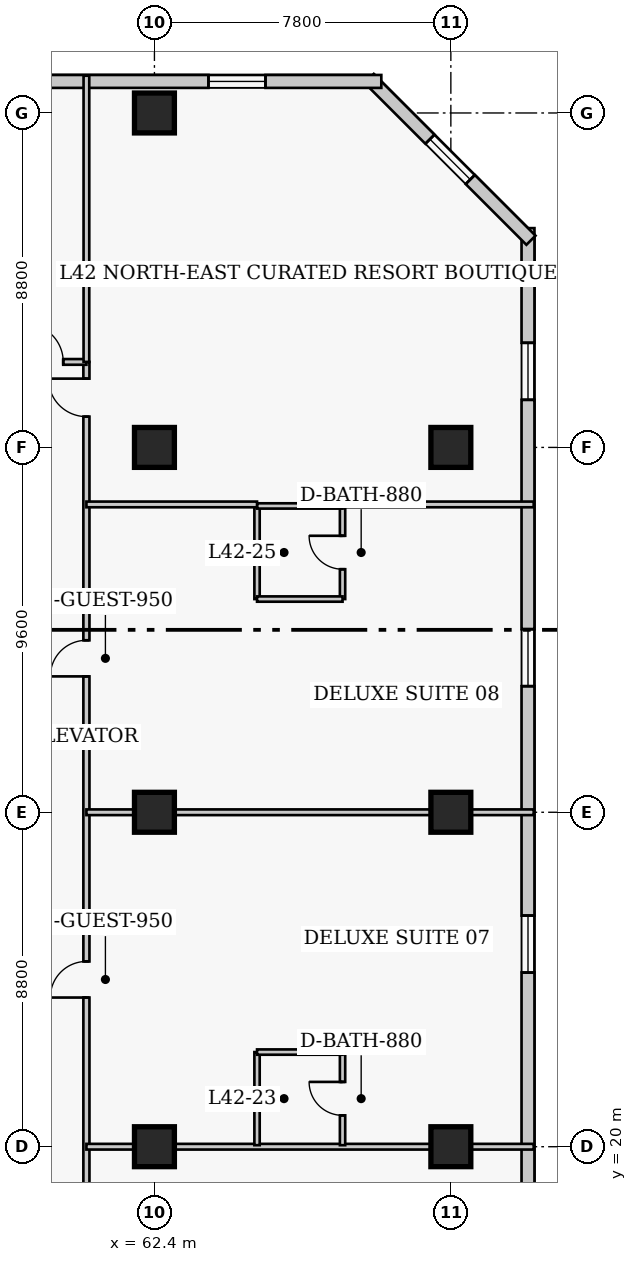
"""IFC4 building model, lengths in metres.
Left out: names, types, materials, properties, quantities, classifications, styles, units other than length and angle.
Written with IfcOpenShell. Run it as: python <this file> out.ifc"""

import sys

from ifc_helpers import new_model, si_unit, direction, frame, frame_2d, origin, origin_2d, place, context, subcontext, project, spatial, rectangle, extrude, element, fill, save


model = new_model("IFC4")
c1 = context("Model", 3, precision=1e-05, world=origin(), true_north=direction((0.0, 1.0)))
c2 = subcontext(c1, "Body", "Model", "MODEL_VIEW")
j1 = project(units=[si_unit("LENGTHUNIT", "METRE"), si_unit("PLANEANGLEUNIT", "RADIAN")], contexts=[c1])
p1 = place(None, origin())
s1 = spatial("IfcSite", under=j1, at=p1, CompositionType="ELEMENT")
p2 = place(p1, origin())
s2 = spatial("IfcBuilding", under=s1, at=p2, CompositionType="ELEMENT")
p3 = place(p2, frame((0.0, 0.0, 168.8)))
s3 = spatial("IfcBuildingStorey", under=s2, at=p3, CompositionType="ELEMENT", Elevation=168.8)
for number, where, z_axis, x_axis in (
    (1, (62.4, 20.0, 0.0), (0.0, 0.0, 1.0), (1.0, 0.0, 0.0)),
    (2, (62.4, 28.8, 0.0), (0.0, 0.0, 1.0), (1.0, 0.0, 0.0)),
    (3, (62.4, 38.4, 0.0), (0.0, 0.0, 1.0), (1.0, 0.0, 0.0)),
    (4, (62.4, 47.2, 0.0), (0.0, 0.0, 1.0), (1.0, 0.0, 0.0)),
    (5, (70.2, 20.0, 0.0), (0.0, 0.0, 1.0), (1.0, 0.0, 0.0)),
    (6, (70.2, 28.8, 0.0), (0.0, 0.0, 1.0), (1.0, 0.0, 0.0)),
    (7, (70.2, 38.4, 0.0), (0.0, 0.0, 1.0), (1.0, 0.0, 0.0)),
):
    element("IfcColumn", number, at=place(p3, frame(where, z_axis=z_axis, x_axis=x_axis)), inside=s3, PredefinedType="COLUMN", context=c2, shape_type="SweptSolid", body=[
        extrude(rectangle(XDim=1.05, YDim=1.05, at=origin_2d()), origin(), (0.0, 0.0, 1.0), 3.8),
    ])
p4 = place(p3, frame((72.23, 14.03, 0.0), z_axis=(0.0, 0.0, 1.0), x_axis=(0.0, 1.0, 0.0)))
e8 = element("IfcWall", 8, at=p4, inside=s3, PredefinedType="SOLIDWALL", context=c2, shape_type="SweptSolid", body=[
    extrude(rectangle(XDim=30.14, YDim=0.34, at=frame_2d((15.07, 0.0))), origin(), (0.0, 0.0, 1.0), 3.55),
])
p5 = place(p4, frame((3.018, 0.0, 0.85)))
e9 = element("IfcOpeningElement", 9, at=p5, cuts=e8, PredefinedType="OPENING", context=c2, shape_type="SweptSolid", body=[
    extrude(rectangle(XDim=1.5, YDim=1.75, at=frame_2d((0.75, 0.875))), frame((0.0, 0.18, 0.0), z_axis=(0.0, -1.0, 0.0), x_axis=(1.0, 0.0, 0.0)), (0.0, 0.0, 1.0), 0.36),
])
p6 = place(p4, frame((10.552, 0.0, 0.85)))
e10 = element("IfcOpeningElement", 10, at=p6, cuts=e8, PredefinedType="OPENING", context=c2, shape_type="SweptSolid", body=[
    extrude(rectangle(XDim=1.5, YDim=1.75, at=frame_2d((0.75, 0.875))), frame((0.0, 0.18, 0.0), z_axis=(0.0, -1.0, 0.0), x_axis=(1.0, 0.0, 0.0)), (0.0, 0.0, 1.0), 0.36),
])
p7 = place(p4, frame((18.087, 0.0, 0.85)))
e11 = element("IfcOpeningElement", 11, at=p7, cuts=e8, PredefinedType="OPENING", context=c2, shape_type="SweptSolid", body=[
    extrude(rectangle(XDim=1.5, YDim=1.75, at=frame_2d((0.75, 0.875))), frame((0.0, 0.18, 0.0), z_axis=(0.0, -1.0, 0.0), x_axis=(1.0, 0.0, 0.0)), (0.0, 0.0, 1.0), 0.36),
])
p8 = place(p4, frame((25.623, 0.0, 0.85)))
e12 = element("IfcOpeningElement", 12, at=p8, cuts=e8, PredefinedType="OPENING", context=c2, shape_type="SweptSolid", body=[
    extrude(rectangle(XDim=1.5, YDim=1.75, at=frame_2d((0.75, 0.875))), frame((0.0, 0.18, 0.0), z_axis=(0.0, -1.0, 0.0), x_axis=(1.0, 0.0, 0.0)), (0.0, 0.0, 1.0), 0.36),
])
p9 = place(p3, frame((72.308, 43.852, 0.0), z_axis=(0.0, 0.0, 1.0), x_axis=(-0.707106781187, 0.707106781187, 0.0)))
e13 = element("IfcWall", 13, at=p9, inside=s3, PredefinedType="SOLIDWALL", context=c2, shape_type="SweptSolid", body=[
    extrude(rectangle(XDim=6.02, YDim=0.34, at=frame_2d((3.01, 0.0))), origin(), (0.0, 0.0, 1.0), 3.55),
])
p10 = place(p9, frame((2.26, 0.0, 0.85)))
e14 = element("IfcOpeningElement", 14, at=p10, cuts=e13, PredefinedType="OPENING", context=c2, shape_type="SweptSolid", body=[
    extrude(rectangle(XDim=1.5, YDim=1.75, at=frame_2d((0.75, 0.875))), frame((0.0, 0.18, 0.0), z_axis=(0.0, -1.0, 0.0), x_axis=(1.0, 0.0, 0.0)), (0.0, 0.0, 1.0), 0.36),
])
p11 = place(p3, frame((68.37, 48.03, 0.0), z_axis=(0.0, 0.0, 1.0), x_axis=(-1.0, 0.0, 0.0)))
e15 = element("IfcWall", 15, at=p11, inside=s3, PredefinedType="SOLIDWALL", context=c2, shape_type="SweptSolid", body=[
    extrude(rectangle(XDim=26.69, YDim=0.34, at=frame_2d((13.345, 0.0))), origin(), (0.0, 0.0, 1.0), 3.55),
])
p12 = place(p11, frame((3.048, 0.0, 0.85)))
e16 = element("IfcOpeningElement", 16, at=p12, cuts=e15, PredefinedType="OPENING", context=c2, shape_type="SweptSolid", body=[
    extrude(rectangle(XDim=1.5, YDim=1.75, at=frame_2d((0.75, 0.875))), frame((0.0, 0.18, 0.0), z_axis=(0.0, -1.0, 0.0), x_axis=(1.0, 0.0, 0.0)), (0.0, 0.0, 1.0), 0.36),
])
p13 = place(p11, frame((11.445, 0.0, 0.85)))
e17 = element("IfcOpeningElement", 17, at=p13, cuts=e15, PredefinedType="OPENING", context=c2, shape_type="SweptSolid", body=[
    extrude(rectangle(XDim=1.5, YDim=1.75, at=frame_2d((0.75, 0.875))), frame((0.0, 0.18, 0.0), z_axis=(0.0, -1.0, 0.0), x_axis=(1.0, 0.0, 0.0)), (0.0, 0.0, 1.0), 0.36),
])
p14 = place(p11, frame((22.642, 0.0, 0.85)))
e18 = element("IfcOpeningElement", 18, at=p14, cuts=e15, PredefinedType="OPENING", context=c2, shape_type="SweptSolid", body=[
    extrude(rectangle(XDim=1.5, YDim=1.75, at=frame_2d((0.75, 0.875))), frame((0.0, 0.18, 0.0), z_axis=(0.0, -1.0, 0.0), x_axis=(1.0, 0.0, 0.0)), (0.0, 0.0, 1.0), 0.36),
])
p15 = place(p3, frame((60.61, 12.05, 0.0), z_axis=(0.0, 0.0, 1.0), x_axis=(0.0, 1.0, 0.0)))
e19 = element("IfcWall", 19, at=p15, inside=s3, PredefinedType="PARTITIONING", context=c2, shape_type="SweptSolid", body=[
    extrude(rectangle(XDim=28.6, YDim=0.16, at=frame_2d((14.3, 0.0))), origin(), (0.0, 0.0, 1.0), 3.55),
])
p16 = place(p15, frame((3.5, 0.0, 0.0)))
e20 = element("IfcOpeningElement", 20, at=p16, cuts=e19, PredefinedType="OPENING", context=c2, shape_type="SweptSolid", body=[
    extrude(rectangle(XDim=0.95, YDim=2.1, at=frame_2d((0.475, 1.05))), frame((0.0, 0.09, 0.0), z_axis=(0.0, -1.0, 0.0), x_axis=(1.0, 0.0, 0.0)), (0.0, 0.0, 1.0), 0.18),
])
p17 = place(p15, frame((11.875, 0.0, 0.0)))
e21 = element("IfcOpeningElement", 21, at=p17, cuts=e19, PredefinedType="OPENING", context=c2, shape_type="SweptSolid", body=[
    extrude(rectangle(XDim=0.95, YDim=2.1, at=frame_2d((0.475, 1.05))), frame((0.0, 0.09, 0.0), z_axis=(0.0, -1.0, 0.0), x_axis=(1.0, 0.0, 0.0)), (0.0, 0.0, 1.0), 0.18),
])
p18 = place(p15, frame((20.325, 0.0, 0.0)))
e22 = element("IfcOpeningElement", 22, at=p18, cuts=e19, PredefinedType="OPENING", context=c2, shape_type="SweptSolid", body=[
    extrude(rectangle(XDim=0.95, YDim=2.1, at=frame_2d((0.475, 1.05))), frame((0.0, 0.09, 0.0), z_axis=(0.0, -1.0, 0.0), x_axis=(1.0, 0.0, 0.0)), (0.0, 0.0, 1.0), 0.18),
])
p19 = place(p15, frame((27.16, 0.0, 0.0)))
e23 = element("IfcOpeningElement", 23, at=p19, cuts=e19, PredefinedType="OPENING", context=c2, shape_type="SweptSolid", body=[
    extrude(rectangle(XDim=1.0, YDim=2.15, at=frame_2d((0.5, 1.075))), frame((0.0, 0.09, 0.0), z_axis=(0.0, -1.0, 0.0), x_axis=(1.0, 0.0, 0.0)), (0.0, 0.0, 1.0), 0.18),
])
p20 = place(p3, frame((56.8, 40.65, 0.0), z_axis=(0.0, 0.0, 1.0), x_axis=(1.0, 0.0, 0.0)))
e24 = element("IfcWall", 24, at=p20, inside=s3, PredefinedType="PARTITIONING", context=c2, shape_type="SweptSolid", body=[
    extrude(rectangle(XDim=3.81, YDim=0.15, at=frame_2d((1.905, 0.0))), origin(), (0.0, 0.0, 1.0), 3.55),
])
p21 = place(p20, frame((2.2, 0.0, 0.0)))
e25 = element("IfcOpeningElement", 25, at=p21, cuts=e24, PredefinedType="OPENING", context=c2, shape_type="SweptSolid", body=[
    extrude(rectangle(XDim=1.0, YDim=2.15, at=frame_2d((0.5, 1.075))), frame((0.0, 0.085, 0.0), z_axis=(0.0, -1.0, 0.0), x_axis=(1.0, 0.0, 0.0)), (0.0, 0.0, 1.0), 0.17),
])
p22 = place(p3, frame((60.61, 40.65, 0.0), z_axis=(0.0, 0.0, 1.0), x_axis=(0.0, 1.0, 0.0)))
e26 = element("IfcWall", 26, at=p22, inside=s3, PredefinedType="PARTITIONING", context=c2, shape_type="SweptSolid", body=[
    extrude(rectangle(XDim=7.53, YDim=0.15, at=frame_2d((3.765, 0.0))), origin(), (0.0, 0.0, 1.0), 3.55),
])
p23 = place(p3, frame((60.61, 20.0, 0.0), z_axis=(0.0, 0.0, 1.0), x_axis=(1.0, 0.0, 0.0)))
e27 = element("IfcWall", 27, at=p23, inside=s3, PredefinedType="PARTITIONING", context=c2, shape_type="SweptSolid", body=[
    extrude(rectangle(XDim=11.77, YDim=0.15, at=frame_2d((5.885, 0.0))), origin(), (0.0, 0.0, 1.0), 2.778),
])
p24 = place(p3, frame((65.1, 20.04, 0.0), z_axis=(0.0, 0.0, 1.0), x_axis=(0.0, 1.0, 0.0)))
e28 = element("IfcWall", 28, at=p24, inside=s3, PredefinedType="PLUMBINGWALL", context=c2, shape_type="SweptSolid", body=[
    extrude(rectangle(XDim=2.45, YDim=0.14, at=frame_2d((1.225, 0.0))), origin(), (0.0, 0.0, 1.0), 3.55),
])
p25 = place(p3, frame((67.35, 20.04, 0.0), z_axis=(0.0, 0.0, 1.0), x_axis=(0.0, 1.0, 0.0)))
e29 = element("IfcWall", 29, at=p25, inside=s3, PredefinedType="PLUMBINGWALL", context=c2, shape_type="SweptSolid", body=[
    extrude(rectangle(XDim=2.45, YDim=0.14, at=frame_2d((1.225, 0.0))), origin(), (0.0, 0.0, 1.0), 3.55),
])
p26 = place(p25, frame((0.785, 0.0, 0.0)))
e30 = element("IfcOpeningElement", 30, at=p26, cuts=e29, PredefinedType="OPENING", context=c2, shape_type="SweptSolid", body=[
    extrude(rectangle(XDim=0.88, YDim=2.05, at=frame_2d((0.44, 1.025))), frame((0.0, 0.08, 0.0), z_axis=(0.0, -1.0, 0.0), x_axis=(1.0, 0.0, 0.0)), (0.0, 0.0, 1.0), 0.16),
])
p27 = place(p3, frame((65.1, 22.49, 0.0), z_axis=(0.0, 0.0, 1.0), x_axis=(1.0, 0.0, 0.0)))
e31 = element("IfcWall", 31, at=p27, inside=s3, PredefinedType="PLUMBINGWALL", context=c2, shape_type="SweptSolid", body=[
    extrude(rectangle(XDim=2.25, YDim=0.14, at=frame_2d((1.125, 0.0))), origin(), (0.0, 0.0, 1.0), 3.55),
])
p28 = place(p3, frame((60.61, 28.8, 0.0), z_axis=(0.0, 0.0, 1.0), x_axis=(1.0, 0.0, 0.0)))
e32 = element("IfcWall", 32, at=p28, inside=s3, PredefinedType="PARTITIONING", context=c2, shape_type="SweptSolid", body=[
    extrude(rectangle(XDim=11.77, YDim=0.15, at=frame_2d((5.885, 0.0))), origin(), (0.0, 0.0, 1.0), 2.778),
])
p29 = place(p3, frame((65.1, 34.41, 0.0), z_axis=(0.0, 0.0, 1.0), x_axis=(0.0, 1.0, 0.0)))
e33 = element("IfcWall", 33, at=p29, inside=s3, PredefinedType="PLUMBINGWALL", context=c2, shape_type="SweptSolid", body=[
    extrude(rectangle(XDim=2.45, YDim=0.14, at=frame_2d((1.225, 0.0))), origin(), (0.0, 0.0, 1.0), 3.55),
])
p30 = place(p3, frame((67.35, 34.41, 0.0), z_axis=(0.0, 0.0, 1.0), x_axis=(0.0, 1.0, 0.0)))
e34 = element("IfcWall", 34, at=p30, inside=s3, PredefinedType="PLUMBINGWALL", context=c2, shape_type="SweptSolid", body=[
    extrude(rectangle(XDim=2.45, YDim=0.14, at=frame_2d((1.225, 0.0))), origin(), (0.0, 0.0, 1.0), 3.55),
])
p31 = place(p30, frame((0.785, 0.0, 0.0)))
e35 = element("IfcOpeningElement", 35, at=p31, cuts=e34, PredefinedType="OPENING", context=c2, shape_type="SweptSolid", body=[
    extrude(rectangle(XDim=0.88, YDim=2.05, at=frame_2d((0.44, 1.025))), frame((0.0, 0.08, 0.0), z_axis=(0.0, -1.0, 0.0), x_axis=(1.0, 0.0, 0.0)), (0.0, 0.0, 1.0), 0.16),
])
for number, where, z_axis, x_axis in (
    (36, (65.1, 34.41, 0.0), (0.0, 0.0, 1.0), (1.0, 0.0, 0.0)),
    (37, (65.1, 36.86, 0.0), (0.0, 0.0, 1.0), (1.0, 0.0, 0.0)),
):
    element("IfcWall", number, at=place(p3, frame(where, z_axis=z_axis, x_axis=x_axis)), inside=s3, PredefinedType="PLUMBINGWALL", context=c2, shape_type="SweptSolid", body=[
        extrude(rectangle(XDim=2.25, YDim=0.14, at=frame_2d((1.125, 0.0))), origin(), (0.0, 0.0, 1.0), 3.55),
    ])
p32 = place(p3, frame((60.61, 36.9, 0.0), z_axis=(0.0, 0.0, 1.0), x_axis=(1.0, 0.0, 0.0)))
e38 = element("IfcWall", 38, at=p32, inside=s3, PredefinedType="PARTITIONING", context=c2, shape_type="SweptSolid", body=[
    extrude(rectangle(XDim=4.49, YDim=0.15, at=frame_2d((2.245, 0.0))), origin(), (0.0, 0.0, 1.0), 3.55),
])
p33 = place(p3, frame((67.35, 36.9, 0.0), z_axis=(0.0, 0.0, 1.0), x_axis=(1.0, 0.0, 0.0)))
e39 = element("IfcWall", 39, at=p33, inside=s3, PredefinedType="PARTITIONING", context=c2, shape_type="SweptSolid", body=[
    extrude(rectangle(XDim=5.03, YDim=0.15, at=frame_2d((2.515, 0.0))), origin(), (0.0, 0.0, 1.0), 3.55),
])
p34 = place(p6, origin())
e40 = element("IfcWindow", 40, at=p34, inside=s3, PartitioningType="SINGLE_PANEL", PredefinedType="WINDOW", context=c2, shape_type="SweptSolid", body=[
    extrude(rectangle(XDim=1.5, YDim=1.75, at=frame_2d((0.75, 0.875))), frame((0.0, 0.03, 0.0), z_axis=(0.0, -1.0, 0.0), x_axis=(1.0, 0.0, 0.0)), (0.0, 0.0, 1.0), 0.06),
])
fill(e10, e40)
p35 = place(p7, origin())
e41 = element("IfcWindow", 41, at=p35, inside=s3, PartitioningType="SINGLE_PANEL", PredefinedType="WINDOW", context=c2, shape_type="SweptSolid", body=[
    extrude(rectangle(XDim=1.5, YDim=1.75, at=frame_2d((0.75, 0.875))), frame((0.0, 0.03, 0.0), z_axis=(0.0, -1.0, 0.0), x_axis=(1.0, 0.0, 0.0)), (0.0, 0.0, 1.0), 0.06),
])
fill(e11, e41)
p36 = place(p8, origin())
e42 = element("IfcWindow", 42, at=p36, inside=s3, PartitioningType="SINGLE_PANEL", PredefinedType="WINDOW", context=c2, shape_type="SweptSolid", body=[
    extrude(rectangle(XDim=1.5, YDim=1.75, at=frame_2d((0.75, 0.875))), frame((0.0, 0.03, 0.0), z_axis=(0.0, -1.0, 0.0), x_axis=(1.0, 0.0, 0.0)), (0.0, 0.0, 1.0), 0.06),
])
fill(e12, e42)
p37 = place(p10, origin())
e43 = element("IfcWindow", 43, at=p37, inside=s3, PartitioningType="SINGLE_PANEL", PredefinedType="WINDOW", context=c2, shape_type="SweptSolid", body=[
    extrude(rectangle(XDim=1.5, YDim=1.75, at=frame_2d((0.75, 0.875))), frame((0.0, 0.03, 0.0), z_axis=(0.0, -1.0, 0.0), x_axis=(1.0, 0.0, 0.0)), (0.0, 0.0, 1.0), 0.06),
])
fill(e14, e43)
p38 = place(p12, origin())
e44 = element("IfcWindow", 44, at=p38, inside=s3, PartitioningType="SINGLE_PANEL", PredefinedType="WINDOW", context=c2, shape_type="SweptSolid", body=[
    extrude(rectangle(XDim=1.5, YDim=1.75, at=frame_2d((0.75, 0.875))), frame((0.0, 0.03, 0.0), z_axis=(0.0, -1.0, 0.0), x_axis=(1.0, 0.0, 0.0)), (0.0, 0.0, 1.0), 0.06),
])
fill(e16, e44)
p39 = place(p21, origin())
e45 = element("IfcDoor", 45, at=p39, inside=s3, OperationType="SINGLE_SWING_LEFT", PredefinedType="DOOR", context=c2, shape_type="SweptSolid", body=[
    extrude(rectangle(XDim=1.0, YDim=2.15, at=frame_2d((0.5, 1.075))), frame((0.0, 0.025, 0.0), z_axis=(0.0, -1.0, 0.0), x_axis=(1.0, 0.0, 0.0)), (0.0, 0.0, 1.0), 0.05),
])
fill(e25, e45)
p40 = place(p26, origin())
e46 = element("IfcDoor", 46, at=p40, inside=s3, OperationType="SINGLE_SWING_RIGHT", PredefinedType="DOOR", context=c2, shape_type="SweptSolid", body=[
    extrude(rectangle(XDim=0.88, YDim=2.05, at=frame_2d((0.44, 1.025))), frame((0.0, 0.025, 0.0), z_axis=(0.0, -1.0, 0.0), x_axis=(1.0, 0.0, 0.0)), (0.0, 0.0, 1.0), 0.05),
])
fill(e30, e46)
p41 = place(p17, origin())
e47 = element("IfcDoor", 47, at=p41, inside=s3, OperationType="SINGLE_SWING_LEFT", PredefinedType="DOOR", context=c2, shape_type="SweptSolid", body=[
    extrude(rectangle(XDim=0.95, YDim=2.1, at=frame_2d((0.475, 1.05))), frame((0.0, 0.025, 0.0), z_axis=(0.0, -1.0, 0.0), x_axis=(1.0, 0.0, 0.0)), (0.0, 0.0, 1.0), 0.05),
])
fill(e21, e47)
p42 = place(p31, origin())
e48 = element("IfcDoor", 48, at=p42, inside=s3, OperationType="SINGLE_SWING_RIGHT", PredefinedType="DOOR", context=c2, shape_type="SweptSolid", body=[
    extrude(rectangle(XDim=0.88, YDim=2.05, at=frame_2d((0.44, 1.025))), frame((0.0, 0.025, 0.0), z_axis=(0.0, -1.0, 0.0), x_axis=(1.0, 0.0, 0.0)), (0.0, 0.0, 1.0), 0.05),
])
fill(e35, e48)
p43 = place(p18, origin())
e49 = element("IfcDoor", 49, at=p43, inside=s3, OperationType="SINGLE_SWING_LEFT", PredefinedType="DOOR", context=c2, shape_type="SweptSolid", body=[
    extrude(rectangle(XDim=0.95, YDim=2.1, at=frame_2d((0.475, 1.05))), frame((0.0, 0.025, 0.0), z_axis=(0.0, -1.0, 0.0), x_axis=(1.0, 0.0, 0.0)), (0.0, 0.0, 1.0), 0.05),
])
fill(e22, e49)
p44 = place(p19, origin())
e50 = element("IfcDoor", 50, at=p44, inside=s3, OperationType="SINGLE_SWING_RIGHT", PredefinedType="DOOR", context=c2, shape_type="SweptSolid", body=[
    extrude(rectangle(XDim=1.0, YDim=2.15, at=frame_2d((0.5, 1.075))), frame((0.0, 0.025, 0.0), z_axis=(0.0, -1.0, 0.0), x_axis=(1.0, 0.0, 0.0)), (0.0, 0.0, 1.0), 0.05),
])
fill(e23, e50)
save(model, sys.argv[1])
